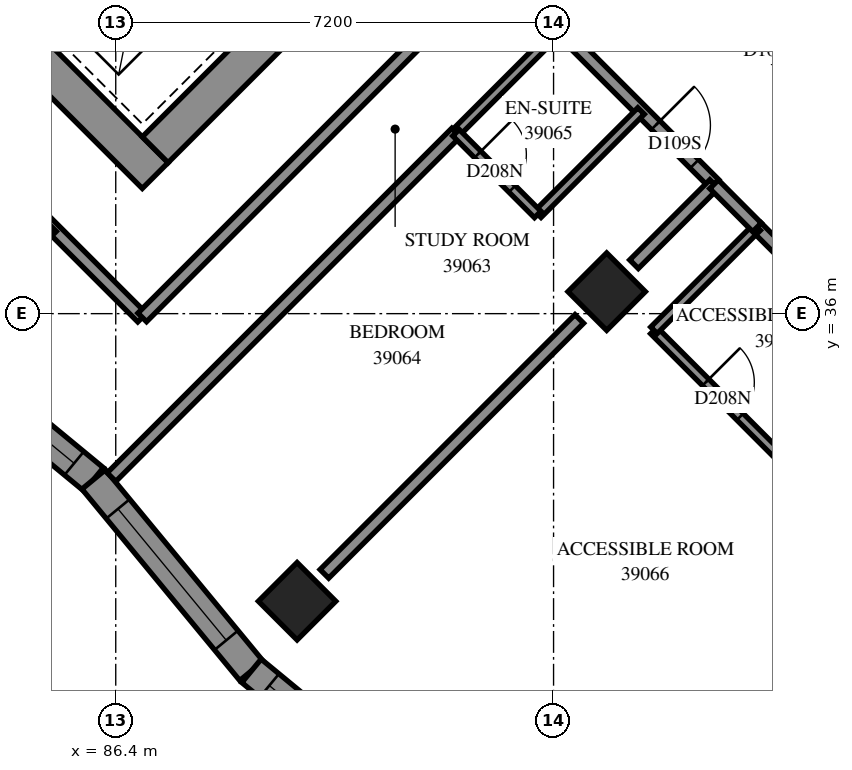
"""IFC4 building model, lengths in metres.
Left out: names, types, materials, properties, quantities, classifications, styles, units other than length and angle.
Written with IfcOpenShell. Run it as: python <this file> out.ifc"""

import sys

from ifc_helpers import new_model, si_unit, direction, frame, frame_2d, origin, origin_2d, place, context, subcontext, project, spatial, polyline, rectangle, outline, extrude, element, fill, save


model = new_model("IFC4")
c1 = context("Model", 3, precision=1e-05, world=origin(), true_north=direction((0.0, 1.0)))
c2 = subcontext(c1, "Body", "Model", "MODEL_VIEW")
j1 = project(units=[si_unit("LENGTHUNIT", "METRE"), si_unit("PLANEANGLEUNIT", "RADIAN")], contexts=[c1])
p1 = place(None, origin())
s1 = spatial("IfcSite", under=j1, at=p1, CompositionType="ELEMENT")
p2 = place(p1, origin())
s2 = spatial("IfcBuilding", under=s1, at=p2, CompositionType="ELEMENT")
p3 = place(p2, frame((0.0, 0.0, 145.6)))
s3 = spatial("IfcBuildingStorey", under=s2, at=p3, CompositionType="ELEMENT", Elevation=145.6)
for number, where, z_axis, x_axis in (
    (1, (94.474, 36.362, 0.0), (0.0, 0.0, 1.0), (0.707, -0.707, 0.0)),
    (2, (89.382, 31.271, 0.0), (0.0, 0.0, 1.0), (0.707, -0.707, 0.0)),
):
    element("IfcColumn", number, at=place(p3, frame(where, z_axis=z_axis, x_axis=x_axis)), inside=s3, PredefinedType="COLUMN", context=c2, shape_type="SweptSolid", body=[
        extrude(rectangle(XDim=0.9, YDim=0.9, at=origin_2d()), origin(), (0.0, 0.0, 1.0), 3.1),
    ])
p4 = place(p3, frame((76.018, 49.302, -0.3), z_axis=(0.0, 0.0, 1.0), x_axis=(0.7071067812, -0.7071067812, 0.0)))
e3 = element("IfcWall", 3, at=p4, inside=s3, PredefinedType="SHEAR", context=c2, shape_type="SweptSolid", body=[
    extrude(rectangle(XDim=15.6, YDim=0.6, at=frame_2d((7.8, 0.0))), origin(), (0.0, 0.0, 1.0), 2.7),
])
p5 = place(p3, frame((87.049, 38.695, -0.3), z_axis=(0.0, 0.0, 1.0), x_axis=(0.7071067812, 0.7071067812, 0.0)))
e4 = element("IfcWall", 4, at=p5, inside=s3, PredefinedType="SHEAR", context=c2, shape_type="SweptSolid", body=[
    extrude(rectangle(XDim=14.4, YDim=0.6, at=frame_2d((7.2, 0.0))), origin(), (0.0, 0.0, 1.0), 2.7),
])
p6 = place(p5, frame((4.55, 0.0, 0.3)))
e5 = element("IfcOpeningElement", 5, at=p6, cuts=e4, PredefinedType="OPENING", context=c2, shape_type="SweptSolid", body=[
    extrude(rectangle(XDim=1.1, YDim=2.1, at=frame_2d((0.55, 1.05))), frame((0.0, 0.31, 0.0), z_axis=(0.0, -1.0, 0.0), x_axis=(1.0, 0.0, 0.0)), (0.0, 0.0, 1.0), 0.62),
])
p7 = place(p5, frame((11.35, 0.0, 0.3)))
e6 = element("IfcOpeningElement", 6, at=p7, cuts=e4, PredefinedType="OPENING", context=c2, shape_type="SweptSolid", body=[
    extrude(rectangle(XDim=1.1, YDim=2.1, at=frame_2d((0.55, 1.05))), frame((0.0, 0.31, 0.0), z_axis=(0.0, -1.0, 0.0), x_axis=(1.0, 0.0, 0.0)), (0.0, 0.0, 1.0), 0.62),
])
p8 = place(p3, frame((82.89, 35.868, 0.0), z_axis=(0.0, 0.0, 1.0), x_axis=(0.7716322406, -0.6360689312, 0.0)))
e7 = element("IfcWall", 7, at=p8, inside=s3, PredefinedType="SOLIDWALL", context=c2, shape_type="SweptSolid", body=[
    extrude(outline(polyline([(-0.024, -0.25), (4.055, -0.25), (4.103, 0.25), (0.024, 0.25), (-0.024, -0.25)])), origin(), (0.0, 0.0, 1.0), 3.1),
])
p9 = place(p8, frame((0.862, 0.0, 0.45)))
e8 = element("IfcOpeningElement", 8, at=p9, cuts=e7, PredefinedType="OPENING", context=c2, shape_type="SweptSolid", body=[
    extrude(rectangle(XDim=2.8, YDim=2.5, at=frame_2d((1.4, 1.25))), frame((0.0, 0.26, 0.0), z_axis=(0.0, -1.0, 0.0), x_axis=(1.0, 0.0, 0.0)), (0.0, 0.0, 1.0), 0.52),
])
p10 = place(p3, frame((86.037, 33.274, 0.0), z_axis=(0.0, 0.0, 1.0), x_axis=(0.636083527, -0.7716202088, 0.0)))
e9 = element("IfcWall", 9, at=p10, inside=s3, PredefinedType="SOLIDWALL", context=c2, shape_type="SweptSolid", body=[
    extrude(outline(polyline([(0.024, -0.25), (4.103, -0.25), (4.055, 0.25), (-0.024, 0.25), (0.024, -0.25)])), origin(), (0.0, 0.0, 1.0), 3.1),
])
p11 = place(p10, frame((0.628, 0.0, 0.45)))
e10 = element("IfcOpeningElement", 10, at=p11, cuts=e9, PredefinedType="OPENING", context=c2, shape_type="SweptSolid", body=[
    extrude(rectangle(XDim=2.8, YDim=2.5, at=frame_2d((1.4, 1.25))), frame((0.0, 0.26, 0.0), z_axis=(0.0, -1.0, 0.0), x_axis=(1.0, 0.0, 0.0)), (0.0, 0.0, 1.0), 0.52),
])
p12 = place(p3, frame((88.632, 30.126, 0.0), z_axis=(0.0, 0.0, 1.0), x_axis=(0.7716131261, -0.6360921188, 0.0)))
e11 = element("IfcWall", 11, at=p12, inside=s3, PredefinedType="SOLIDWALL", context=c2, shape_type="SweptSolid", body=[
    extrude(outline(polyline([(-0.024, -0.25), (4.055, -0.25), (4.14, 0.25), (0.024, 0.25), (-0.024, -0.25)])), origin(), (0.0, 0.0, 1.0), 3.1),
])
p13 = place(p12, frame((0.38, 0.0, 0.45)))
e12 = element("IfcOpeningElement", 12, at=p13, cuts=e11, PredefinedType="OPENING", context=c2, shape_type="SweptSolid", body=[
    extrude(rectangle(XDim=2.8, YDim=2.5, at=frame_2d((1.4, 1.25))), frame((0.0, 0.26, 0.0), z_axis=(0.0, -1.0, 0.0), x_axis=(1.0, 0.0, 0.0)), (0.0, 0.0, 1.0), 0.52),
])
p14 = place(p3, frame((94.189, 43.287, 0.0), z_axis=(0.0, 0.0, 1.0), x_axis=(0.7071067812, -0.7071067812, 0.0)))
e13 = element("IfcWall", 13, at=p14, inside=s3, PredefinedType="PARTITIONING", context=c2, shape_type="SweptSolid", body=[
    extrude(rectangle(XDim=12.298, YDim=0.2, at=frame_2d((6.149, 0.0))), origin(), (0.0, 0.0, 1.0), 3.1),
])
p15 = place(p14, frame((3.755, 0.0, 0.0)))
e14 = element("IfcOpeningElement", 14, at=p15, cuts=e13, PredefinedType="OPENING", context=c2, shape_type="SweptSolid", body=[
    extrude(rectangle(XDim=0.9, YDim=2.1, at=frame_2d((0.45, 1.05))), frame((0.0, 0.11, 0.0), z_axis=(0.0, -1.0, 0.0), x_axis=(1.0, 0.0, 0.0)), (0.0, 0.0, 1.0), 0.22),
])
p16 = place(p14, frame((10.998, 0.0, 0.0)))
e15 = element("IfcOpeningElement", 15, at=p16, cuts=e13, PredefinedType="OPENING", context=c2, shape_type="SweptSolid", body=[
    extrude(rectangle(XDim=0.9, YDim=2.1, at=frame_2d((0.45, 1.05))), frame((0.0, 0.11, 0.0), z_axis=(0.0, -1.0, 0.0), x_axis=(1.0, 0.0, 0.0)), (0.0, 0.0, 1.0), 0.22),
])
p17 = place(p3, frame((80.899, 41.869, 0.0), z_axis=(0.0, 0.0, 1.0), x_axis=(0.7071067812, -0.7071067812, 0.0)))
e16 = element("IfcWall", 16, at=p17, inside=s3, PredefinedType="PARTITIONING", context=c2, shape_type="SweptSolid", body=[
    extrude(rectangle(XDim=8.392, YDim=0.2, at=frame_2d((4.196, 0.0))), origin(), (0.0, 0.0, 1.0), 3.1),
])
p18 = place(p17, frame((4.988, 0.0, 0.0)))
e17 = element("IfcOpeningElement", 17, at=p18, cuts=e16, PredefinedType="OPENING", context=c2, shape_type="SweptSolid", body=[
    extrude(rectangle(XDim=0.9, YDim=2.1, at=frame_2d((0.45, 1.05))), frame((0.0, 0.11, 0.0), z_axis=(0.0, -1.0, 0.0), x_axis=(1.0, 0.0, 0.0)), (0.0, 0.0, 1.0), 0.22),
])
p19 = place(p3, frame((86.836, 35.938, 0.0), z_axis=(0.0, 0.0, 1.0), x_axis=(0.7071067812, 0.7071067812, 0.0)))
e18 = element("IfcWall", 18, at=p19, inside=s3, PredefinedType="PARTITIONING", context=c2, shape_type="SweptSolid", body=[
    extrude(rectangle(XDim=8.2, YDim=0.2, at=frame_2d((4.1, 0.0))), origin(), (0.0, 0.0, 1.0), 3.1),
])
p20 = place(p3, frame((86.33, 33.311, 0.0), z_axis=(0.0, 0.0, 1.0), x_axis=(0.7071005425, 0.7071130198, 0.0)))
e19 = element("IfcWall", 19, at=p20, inside=s3, PredefinedType="PARTITIONING", context=c2, shape_type="SweptSolid", body=[
    extrude(rectangle(XDim=8.015, YDim=0.2, at=frame_2d((4.007, 0.0))), origin(), (0.0, 0.0, 1.0), 3.1),
])
p21 = place(p3, frame((89.831, 31.721, 0.0), z_axis=(0.0, 0.0, 1.0), x_axis=(0.7071067812, 0.7071067812, 0.0)))
e20 = element("IfcWall", 20, at=p21, inside=s3, PredefinedType="PARTITIONING", context=c2, shape_type="SweptSolid", body=[
    extrude(rectangle(XDim=5.928, YDim=0.2, at=frame_2d((2.964, 0.0))), origin(), (0.0, 0.0, 1.0), 3.1),
])
p22 = place(p3, frame((94.923, 26.631, 0.0), z_axis=(0.0, 0.0, 1.0), x_axis=(0.7071067812, 0.7071067812, 0.0)))
e21 = element("IfcWall", 21, at=p22, inside=s3, PredefinedType="PARTITIONING", context=c2, shape_type="SweptSolid", body=[
    extrude(rectangle(XDim=5.926, YDim=0.2, at=frame_2d((2.963, 0.0))), origin(), (0.0, 0.0, 1.0), 2.6),
])
p23 = place(p3, frame((92.639, 41.739, 0.0), z_axis=(0.0, 0.0, 1.0), x_axis=(0.7071067812, -0.7071067812, 0.0)))
e22 = element("IfcWall", 22, at=p23, inside=s3, PredefinedType="PARTITIONING", context=c2, shape_type="SweptSolid", body=[
    extrude(rectangle(XDim=5.1, YDim=0.2, at=frame_2d((2.55, 0.0))), origin(), (0.0, 0.0, 1.0), 3.1),
])
p24 = place(p23, frame((0.123, 0.0, 0.0)))
e23 = element("IfcOpeningElement", 23, at=p24, cuts=e22, PredefinedType="OPENING", context=c2, shape_type="SweptSolid", body=[
    extrude(rectangle(XDim=1.0, YDim=2.1, at=frame_2d((0.5, 1.05))), frame((0.0, 0.11, 0.0), z_axis=(0.0, -1.0, 0.0), x_axis=(1.0, 0.0, 0.0)), (0.0, 0.0, 1.0), 0.22),
])
p25 = place(p23, frame((3.734, 0.0, 0.0)))
e24 = element("IfcOpeningElement", 24, at=p25, cuts=e22, PredefinedType="OPENING", context=c2, shape_type="SweptSolid", body=[
    extrude(rectangle(XDim=0.9, YDim=2.1, at=frame_2d((0.45, 1.05))), frame((0.0, 0.11, 0.0), z_axis=(0.0, -1.0, 0.0), x_axis=(1.0, 0.0, 0.0)), (0.0, 0.0, 1.0), 0.22),
])
p26 = place(p3, frame((95.249, 35.723, 0.0), z_axis=(0.0, 0.0, 1.0), x_axis=(0.7067942478, -0.7074191764, 0.0)))
e25 = element("IfcWall", 25, at=p26, inside=s3, PredefinedType="PARTITIONING", context=c2, shape_type="SweptSolid", body=[
    extrude(rectangle(XDim=3.2, YDim=0.15, at=frame_2d((1.6, 0.0))), origin(), (0.0, 0.0, 1.0), 3.1),
])
p27 = place(p26, frame((1.206, 0.0, 0.0)))
e26 = element("IfcOpeningElement", 26, at=p27, cuts=e25, PredefinedType="OPENING", context=c2, shape_type="SweptSolid", body=[
    extrude(rectangle(XDim=0.8, YDim=2.1, at=frame_2d((0.4, 1.05))), frame((0.0, 0.085, 0.0), z_axis=(0.0, -1.0, 0.0), x_axis=(1.0, 0.0, 0.0)), (0.0, 0.0, 1.0), 0.17),
])
p28 = place(p3, frame((96.945, 37.419, 0.0), z_axis=(0.0, 0.0, 1.0), x_axis=(0.7071067812, -0.7071067812, 0.0)))
e27 = element("IfcWall", 27, at=p28, inside=s3, PredefinedType="PARTITIONING", context=c2, shape_type="SweptSolid", body=[
    extrude(rectangle(XDim=2.927, YDim=0.2, at=frame_2d((1.464, 0.0))), origin(), (0.0, 0.0, 1.0), 3.1),
])
for number, where, z_axis, x_axis in (
    (28, (93.341, 37.635, 0.0), (0.0, 0.0, 1.0), (0.707, 0.707, 0.0)),
    (29, (91.997, 38.979, 0.0), (0.0, 0.0, 1.0), (0.707, 0.707, 0.0)),
):
    element("IfcWall", number, at=place(p3, frame(where, z_axis=z_axis, x_axis=x_axis)), inside=s3, PredefinedType="PARTITIONING", context=c2, shape_type="SweptSolid", body=[
        extrude(rectangle(XDim=2.401, YDim=0.15, at=frame_2d((1.201, 0.0))), origin(), (0.0, 0.0, 1.0), 3.1),
    ])
p29 = place(p3, frame((95.251, 35.727, 0.0), z_axis=(0.0, 0.0, 1.0), x_axis=(0.7071067812, 0.7071067812, 0.0)))
e30 = element("IfcWall", 30, at=p29, inside=s3, PredefinedType="PARTITIONING", context=c2, shape_type="SweptSolid", body=[
    extrude(rectangle(XDim=2.398, YDim=0.15, at=frame_2d((1.199, 0.0))), origin(), (0.0, 0.0, 1.0), 3.1),
])
p30 = place(p3, frame((91.995, 38.975, 0.0), z_axis=(0.0, 0.0, 1.0), x_axis=(0.7071067812, -0.7071067812, 0.0)))
e31 = element("IfcWall", 31, at=p30, inside=s3, PredefinedType="PARTITIONING", context=c2, shape_type="SweptSolid", body=[
    extrude(rectangle(XDim=1.901, YDim=0.15, at=frame_2d((0.95, 0.0))), origin(), (0.0, 0.0, 1.0), 3.1),
])
p31 = place(p30, frame((0.506, 0.0, 0.0)))
e32 = element("IfcOpeningElement", 32, at=p31, cuts=e31, PredefinedType="OPENING", context=c2, shape_type="SweptSolid", body=[
    extrude(rectangle(XDim=0.8, YDim=2.1, at=frame_2d((0.4, 1.05))), frame((0.0, 0.085, 0.0), z_axis=(0.0, -1.0, 0.0), x_axis=(1.0, 0.0, 0.0)), (0.0, 0.0, 1.0), 0.17),
])
p32 = place(p3, frame((94.923, 36.813, 0.0), z_axis=(0.0, 0.0, 1.0), x_axis=(0.7071067812, 0.7071067812, 0.0)))
e33 = element("IfcWall", 33, at=p32, inside=s3, PredefinedType="PARTITIONING", context=c2, shape_type="SweptSolid", body=[
    extrude(rectangle(XDim=1.864, YDim=0.2, at=frame_2d((0.932, 0.0))), origin(), (0.0, 0.0, 1.0), 3.1),
])
p33 = place(p3, frame((96.24, 38.128, 0.0), z_axis=(0.0, 0.0, 1.0), x_axis=(0.7061059238, -0.7081062239, 0.0)))
e34 = element("IfcWall", 34, at=p33, inside=s3, PredefinedType="PARTITIONING", context=c2, shape_type="SweptSolid", body=[
    extrude(rectangle(XDim=1.0, YDim=0.2, at=frame_2d((0.5, 0.0))), origin(), (0.0, 0.0, 1.0), 3.1),
])
p34 = place(p3, frame((84.741, 36.813, 0.0), z_axis=(0.0, 0.0, 1.0), x_axis=(0.7071067812, 0.7071067812, 0.0)))
e35 = element("IfcWall", 35, at=p34, inside=s3, PredefinedType="PARTITIONING", context=c2, shape_type="SweptSolid", body=[
    extrude(rectangle(XDim=0.863, YDim=0.2, at=frame_2d((0.431, 0.0))), origin(), (0.0, 0.0, 1.0), 3.1),
])
p35 = place(p9, origin())
e36 = element("IfcWindow", 36, at=p35, inside=s3, PartitioningType="SINGLE_PANEL", PredefinedType="WINDOW", context=c2, shape_type="SweptSolid", body=[
    extrude(rectangle(XDim=2.8, YDim=2.5, at=frame_2d((1.4, 1.25))), frame((0.0, 0.18, 0.0), z_axis=(0.0, -1.0, 0.0), x_axis=(1.0, 0.0, 0.0)), (0.0, 0.0, 1.0), 0.06),
])
fill(e8, e36)
p36 = place(p11, origin())
e37 = element("IfcWindow", 37, at=p36, inside=s3, PartitioningType="SINGLE_PANEL", PredefinedType="WINDOW", context=c2, shape_type="SweptSolid", body=[
    extrude(rectangle(XDim=2.8, YDim=2.5, at=frame_2d((1.4, 1.25))), frame((0.0, 0.18, 0.0), z_axis=(0.0, -1.0, 0.0), x_axis=(1.0, 0.0, 0.0)), (0.0, 0.0, 1.0), 0.06),
])
fill(e10, e37)
p37 = place(p13, origin())
e38 = element("IfcWindow", 38, at=p37, inside=s3, PartitioningType="SINGLE_PANEL", PredefinedType="WINDOW", context=c2, shape_type="SweptSolid", body=[
    extrude(rectangle(XDim=2.8, YDim=2.5, at=frame_2d((1.4, 1.25))), frame((0.0, 0.18, 0.0), z_axis=(0.0, -1.0, 0.0), x_axis=(1.0, 0.0, 0.0)), (0.0, 0.0, 1.0), 0.06),
])
fill(e12, e38)
p38 = place(p15, origin())
e39 = element("IfcDoor", 39, at=p38, inside=s3, OperationType="SINGLE_SWING_RIGHT", PredefinedType="DOOR", context=c2, shape_type="SweptSolid", body=[
    extrude(rectangle(XDim=0.9, YDim=2.1, at=frame_2d((0.45, 1.05))), frame((0.0, 0.025, 0.0), z_axis=(0.0, -1.0, 0.0), x_axis=(1.0, 0.0, 0.0)), (0.0, 0.0, 1.0), 0.05),
])
fill(e14, e39)
p39 = place(p25, origin())
e40 = element("IfcDoor", 40, at=p39, inside=s3, OperationType="SINGLE_SWING_LEFT", PredefinedType="DOOR", context=c2, shape_type="SweptSolid", body=[
    extrude(rectangle(XDim=0.9, YDim=2.1, at=frame_2d((0.45, 1.05))), frame((0.0, 0.025, 0.0), z_axis=(0.0, -1.0, 0.0), x_axis=(1.0, 0.0, 0.0)), (0.0, 0.0, 1.0), 0.05),
])
fill(e24, e40)
p40 = place(p31, origin())
e41 = element("IfcDoor", 41, at=p40, inside=s3, OperationType="SINGLE_SWING_RIGHT", PredefinedType="DOOR", context=c2, shape_type="SweptSolid", body=[
    extrude(rectangle(XDim=0.8, YDim=2.1, at=frame_2d((0.4, 1.05))), frame((0.0, 0.025, 0.0), z_axis=(0.0, -1.0, 0.0), x_axis=(1.0, 0.0, 0.0)), (0.0, 0.0, 1.0), 0.05),
])
fill(e32, e41)
p41 = place(p27, origin())
e42 = element("IfcDoor", 42, at=p41, inside=s3, OperationType="SINGLE_SWING_RIGHT", PredefinedType="DOOR", context=c2, shape_type="SweptSolid", body=[
    extrude(rectangle(XDim=0.8, YDim=2.1, at=frame_2d((0.4, 1.05))), frame((0.0, 0.025, 0.0), z_axis=(0.0, -1.0, 0.0), x_axis=(1.0, 0.0, 0.0)), (0.0, 0.0, 1.0), 0.05),
])
fill(e26, e42)
save(model, sys.argv[1])
